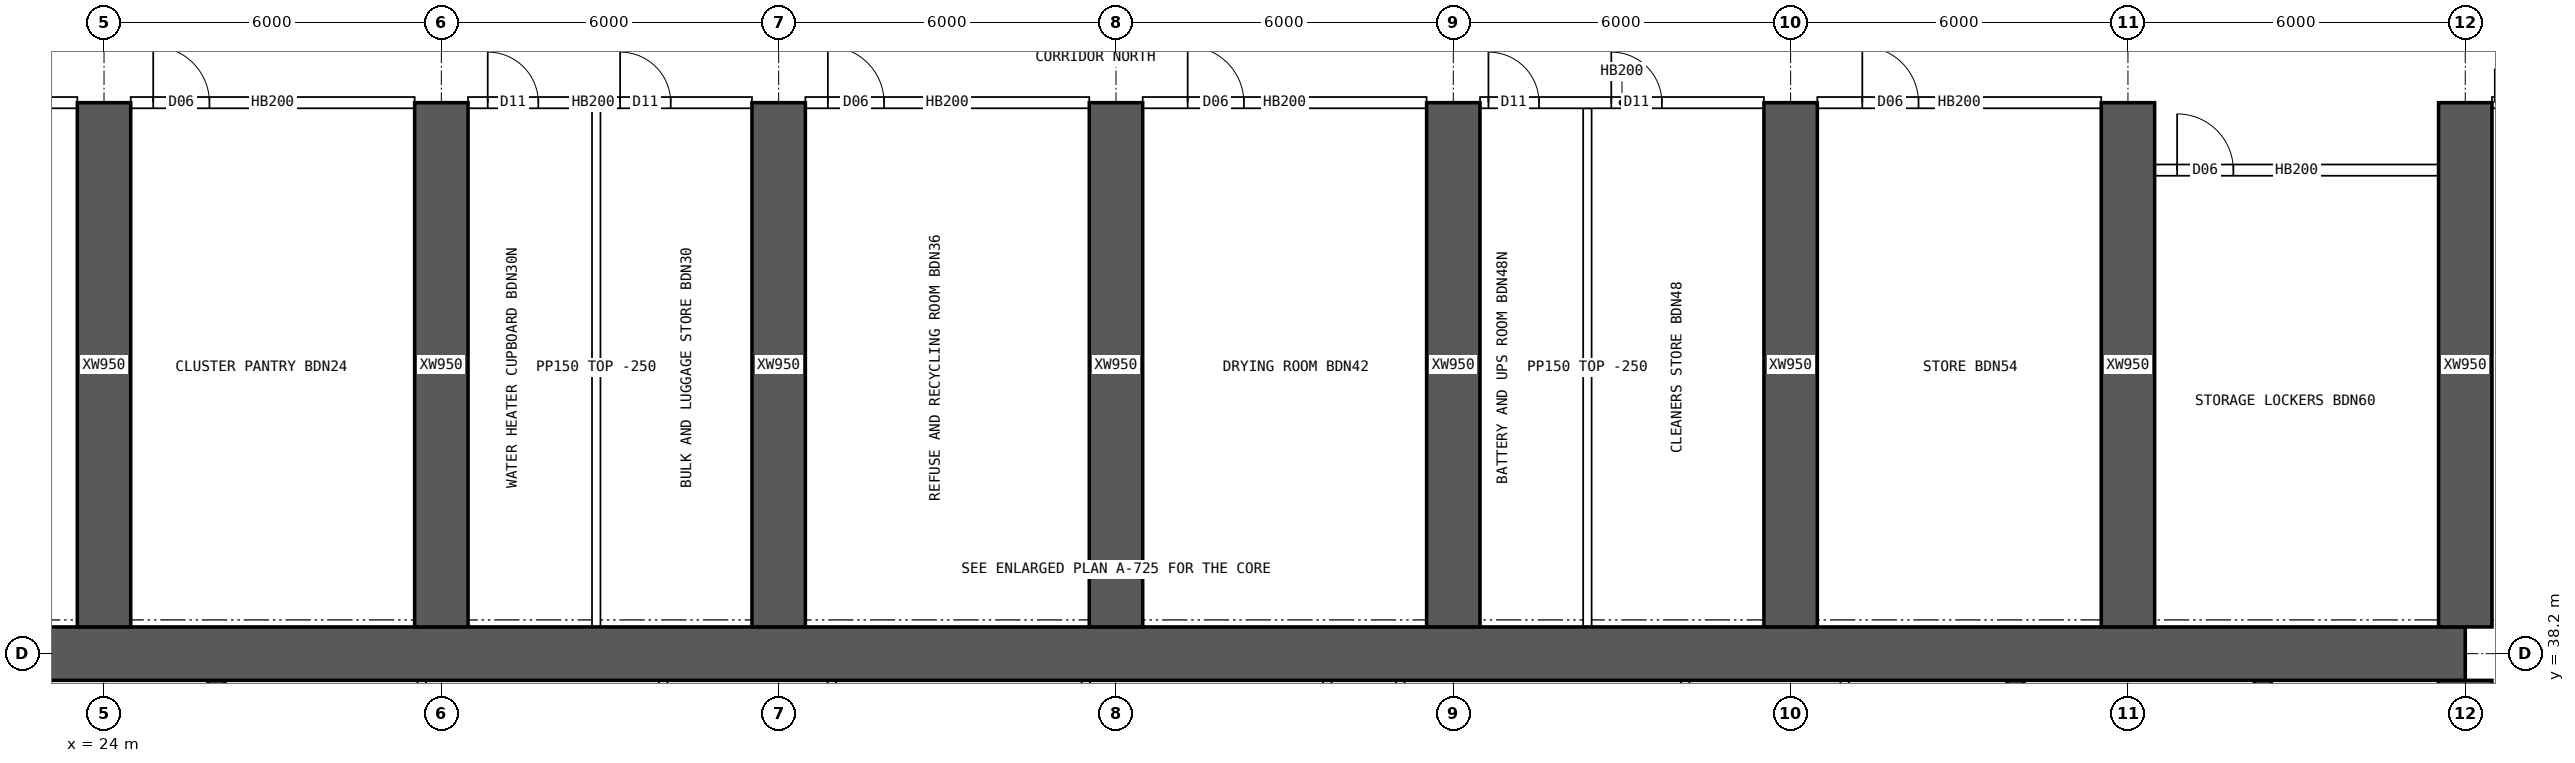
"""IFC4 building model, lengths in metres.
Left out: names, types, materials, properties, quantities, classifications, styles, units other than length and angle.
Written with IfcOpenShell. Run it as: python <this file> out.ifc"""

import sys

from ifc_helpers import new_model, si_unit, direction, frame, frame_2d, origin, place, context, subcontext, project, spatial, rectangle, extrude, element, fill, save


model = new_model("IFC4")
c1 = context("Model", 3, precision=1e-05, world=origin(), true_north=direction((0.0, 1.0)))
c2 = subcontext(c1, "Body", "Model", "MODEL_VIEW")
j1 = project(units=[si_unit("LENGTHUNIT", "METRE"), si_unit("PLANEANGLEUNIT", "RADIAN")], contexts=[c1])
p1 = place(None, origin())
s1 = spatial("IfcSite", under=j1, at=p1, CompositionType="ELEMENT")
p2 = place(p1, origin())
s2 = spatial("IfcBuilding", under=s1, at=p2, CompositionType="ELEMENT")
p3 = place(p2, frame((0.0, 0.0, 91.9)))
s3 = spatial("IfcBuildingStorey", under=s2, at=p3, CompositionType="ELEMENT", Elevation=91.9)
p4 = place(p3, frame((18.0, 38.2, 0.0), z_axis=(0.0, 0.0, 1.0), x_axis=(1.0, 0.0, 0.0)))
e1 = element("IfcWall", 1, at=p4, inside=s3, PredefinedType="SHEAR", context=c2, shape_type="SweptSolid", body=[
    extrude(rectangle(XDim=48.0, YDim=0.95, at=frame_2d((24.0, 0.0))), origin(), (0.0, 0.0, 1.0), 3.75),
])
p5 = place(p3, frame((66.0, 26.275, 0.0), z_axis=(0.0, 0.0, 1.0), x_axis=(0.0, 1.0, 0.0)))
e2 = element("IfcWall", 2, at=p5, inside=s3, PredefinedType="SHEAR", context=c2, shape_type="SweptSolid", body=[
    extrude(rectangle(XDim=11.45, YDim=0.95, at=frame_2d((5.725, 0.0))), origin(), (0.0, 0.0, 1.0), 3.75),
])
p6 = place(p5, frame((5.025, 0.0, 0.0)))
e3 = element("IfcOpeningElement", 3, at=p6, cuts=e2, PredefinedType="OPENING", context=c2, shape_type="SweptSolid", body=[
    extrude(rectangle(XDim=1.2, YDim=2.1, at=frame_2d((0.6, 1.05))), frame((0.0, 0.485, 0.0), z_axis=(0.0, -1.0, 0.0), x_axis=(1.0, 0.0, 0.0)), (0.0, 0.0, 1.0), 0.97),
])
for number, where, z_axis, x_axis in (
    (4, (62.4, 34.75, 0.0), (0.0, 0.0, 1.0), (0.0, 1.0, 0.0)),
    (5, (26.0, 34.75, 0.0), (0.0, 0.0, 1.0), (0.0, 1.0, 0.0)),
    (6, (58.0, 34.75, 0.0), (0.0, 0.0, 1.0), (0.0, 1.0, 0.0)),
):
    element("IfcWall", number, at=place(p3, frame(where, z_axis=z_axis, x_axis=x_axis)), inside=s3, PredefinedType="SHEAR", context=c2, shape_type="SweptSolid", body=[
        extrude(rectangle(XDim=2.975, YDim=0.3, at=frame_2d((1.488, 0.0))), origin(), (0.0, 0.0, 1.0), 3.75),
    ])
for number, where, z_axis, x_axis in (
    (7, (24.0, 38.675, 0.0), (0.0, 0.0, 1.0), (0.0, 1.0, 0.0)),
    (8, (30.0, 38.675, 0.0), (0.0, 0.0, 1.0), (0.0, 1.0, 0.0)),
    (9, (36.0, 38.675, 0.0), (0.0, 0.0, 1.0), (0.0, 1.0, 0.0)),
    (10, (42.0, 38.675, 0.0), (0.0, 0.0, 1.0), (0.0, 1.0, 0.0)),
    (11, (48.0, 38.675, 0.0), (0.0, 0.0, 1.0), (0.0, 1.0, 0.0)),
    (12, (54.0, 38.675, 0.0), (0.0, 0.0, 1.0), (0.0, 1.0, 0.0)),
    (13, (60.0, 38.675, 0.0), (0.0, 0.0, 1.0), (0.0, 1.0, 0.0)),
    (14, (66.0, 38.675, 0.0), (0.0, 0.0, 1.0), (0.0, 1.0, 0.0)),
):
    element("IfcWall", number, at=place(p3, frame(where, z_axis=z_axis, x_axis=x_axis)), inside=s3, PredefinedType="SHEAR", context=c2, shape_type="SweptSolid", body=[
        extrude(rectangle(XDim=9.325, YDim=0.95, at=frame_2d((4.663, 0.0))), origin(), (0.0, 0.0, 1.0), 3.75),
    ])
for number, where, z_axis, x_axis in (
    (15, (29.651, 34.75, 0.0), (0.0, 0.0, 1.0), (0.0, 1.0, 0.0)),
    (16, (33.946, 34.75, 0.0), (0.0, 0.0, 1.0), (0.0, 1.0, 0.0)),
    (17, (36.946, 34.75, 0.0), (0.0, 0.0, 1.0), (0.0, 1.0, 0.0)),
    (18, (41.463, 34.75, 0.0), (0.0, 0.0, 1.0), (0.0, 1.0, 0.0)),
    (19, (45.758, 34.75, 0.0), (0.0, 0.0, 1.0), (0.0, 1.0, 0.0)),
    (20, (47.058, 34.75, 0.0), (0.0, 0.0, 1.0), (0.0, 1.0, 0.0)),
    (21, (52.124, 34.75, 0.0), (0.0, 0.0, 1.0), (0.0, 1.0, 0.0)),
    (22, (54.961, 34.75, 0.0), (0.0, 0.0, 1.0), (0.0, 1.0, 0.0)),
):
    element("IfcWall", number, at=place(p3, frame(where, z_axis=z_axis, x_axis=x_axis)), inside=s3, PredefinedType="SOLIDWALL", context=c2, shape_type="SweptSolid", body=[
        extrude(rectangle(XDim=2.975, YDim=0.15, at=frame_2d((1.488, 0.0))), origin(), (0.0, 0.0, 1.0), 3.5),
    ])
p7 = place(p3, frame((18.475, 48.0, 0.0), z_axis=(0.0, 0.0, 1.0), x_axis=(1.0, 0.0, 0.0)))
e23 = element("IfcWall", 23, at=p7, inside=s3, PredefinedType="SOLIDWALL", context=c2, shape_type="SweptSolid", body=[
    extrude(rectangle(XDim=5.05, YDim=0.2, at=frame_2d((2.525, 0.0))), origin(), (0.0, 0.0, 1.0), 3.5),
])
p8 = place(p7, frame((0.35, 0.0, 0.0)))
e24 = element("IfcOpeningElement", 24, at=p8, cuts=e23, PredefinedType="OPENING", context=c2, shape_type="SweptSolid", body=[
    extrude(rectangle(XDim=0.9, YDim=2.1, at=frame_2d((0.45, 1.05))), frame((0.0, 0.11, 0.0), z_axis=(0.0, -1.0, 0.0), x_axis=(1.0, 0.0, 0.0)), (0.0, 0.0, 1.0), 0.22),
])
p9 = place(p7, frame((2.665, 0.0, 0.0)))
e25 = element("IfcOpeningElement", 25, at=p9, cuts=e23, PredefinedType="OPENING", context=c2, shape_type="SweptSolid", body=[
    extrude(rectangle(XDim=0.9, YDim=2.1, at=frame_2d((0.45, 1.05))), frame((0.0, 0.11, 0.0), z_axis=(0.0, -1.0, 0.0), x_axis=(1.0, 0.0, 0.0)), (0.0, 0.0, 1.0), 0.22),
])
p10 = place(p3, frame((24.475, 48.0, 0.0), z_axis=(0.0, 0.0, 1.0), x_axis=(1.0, 0.0, 0.0)))
e26 = element("IfcWall", 26, at=p10, inside=s3, PredefinedType="SOLIDWALL", context=c2, shape_type="SweptSolid", body=[
    extrude(rectangle(XDim=5.05, YDim=0.2, at=frame_2d((2.525, 0.0))), origin(), (0.0, 0.0, 1.0), 3.5),
])
p11 = place(p10, frame((0.4, 0.0, 0.0)))
e27 = element("IfcOpeningElement", 27, at=p11, cuts=e26, PredefinedType="OPENING", context=c2, shape_type="SweptSolid", body=[
    extrude(rectangle(XDim=1.0, YDim=2.1, at=frame_2d((0.5, 1.05))), frame((0.0, 0.11, 0.0), z_axis=(0.0, -1.0, 0.0), x_axis=(1.0, 0.0, 0.0)), (0.0, 0.0, 1.0), 0.22),
])
p12 = place(p3, frame((30.475, 48.0, 0.0), z_axis=(0.0, 0.0, 1.0), x_axis=(1.0, 0.0, 0.0)))
e28 = element("IfcWall", 28, at=p12, inside=s3, PredefinedType="SOLIDWALL", context=c2, shape_type="SweptSolid", body=[
    extrude(rectangle(XDim=5.05, YDim=0.2, at=frame_2d((2.525, 0.0))), origin(), (0.0, 0.0, 1.0), 3.5),
])
p13 = place(p12, frame((0.35, 0.0, 0.0)))
e29 = element("IfcOpeningElement", 29, at=p13, cuts=e28, PredefinedType="OPENING", context=c2, shape_type="SweptSolid", body=[
    extrude(rectangle(XDim=0.9, YDim=2.1, at=frame_2d((0.45, 1.05))), frame((0.0, 0.11, 0.0), z_axis=(0.0, -1.0, 0.0), x_axis=(1.0, 0.0, 0.0)), (0.0, 0.0, 1.0), 0.22),
])
p14 = place(p12, frame((2.705, 0.0, 0.0)))
e30 = element("IfcOpeningElement", 30, at=p14, cuts=e28, PredefinedType="OPENING", context=c2, shape_type="SweptSolid", body=[
    extrude(rectangle(XDim=0.9, YDim=2.1, at=frame_2d((0.45, 1.05))), frame((0.0, 0.11, 0.0), z_axis=(0.0, -1.0, 0.0), x_axis=(1.0, 0.0, 0.0)), (0.0, 0.0, 1.0), 0.22),
])
p15 = place(p3, frame((36.475, 48.0, 0.0), z_axis=(0.0, 0.0, 1.0), x_axis=(1.0, 0.0, 0.0)))
e31 = element("IfcWall", 31, at=p15, inside=s3, PredefinedType="SOLIDWALL", context=c2, shape_type="SweptSolid", body=[
    extrude(rectangle(XDim=5.05, YDim=0.2, at=frame_2d((2.525, 0.0))), origin(), (0.0, 0.0, 1.0), 3.5),
])
p16 = place(p15, frame((0.4, 0.0, 0.0)))
e32 = element("IfcOpeningElement", 32, at=p16, cuts=e31, PredefinedType="OPENING", context=c2, shape_type="SweptSolid", body=[
    extrude(rectangle(XDim=1.0, YDim=2.1, at=frame_2d((0.5, 1.05))), frame((0.0, 0.11, 0.0), z_axis=(0.0, -1.0, 0.0), x_axis=(1.0, 0.0, 0.0)), (0.0, 0.0, 1.0), 0.22),
])
p17 = place(p3, frame((42.475, 48.0, 0.0), z_axis=(0.0, 0.0, 1.0), x_axis=(1.0, 0.0, 0.0)))
e33 = element("IfcWall", 33, at=p17, inside=s3, PredefinedType="SOLIDWALL", context=c2, shape_type="SweptSolid", body=[
    extrude(rectangle(XDim=5.05, YDim=0.2, at=frame_2d((2.525, 0.0))), origin(), (0.0, 0.0, 1.0), 3.5),
])
p18 = place(p17, frame((0.8, 0.0, 0.0)))
e34 = element("IfcOpeningElement", 34, at=p18, cuts=e33, PredefinedType="OPENING", context=c2, shape_type="SweptSolid", body=[
    extrude(rectangle(XDim=1.0, YDim=2.1, at=frame_2d((0.5, 1.05))), frame((0.0, 0.11, 0.0), z_axis=(0.0, -1.0, 0.0), x_axis=(1.0, 0.0, 0.0)), (0.0, 0.0, 1.0), 0.22),
])
p19 = place(p3, frame((48.475, 48.0, 0.0), z_axis=(0.0, 0.0, 1.0), x_axis=(1.0, 0.0, 0.0)))
e35 = element("IfcWall", 35, at=p19, inside=s3, PredefinedType="SOLIDWALL", context=c2, shape_type="SweptSolid", body=[
    extrude(rectangle(XDim=5.05, YDim=0.2, at=frame_2d((2.525, 0.0))), origin(), (0.0, 0.0, 1.0), 3.5),
])
p20 = place(p19, frame((0.15, 0.0, 0.0)))
e36 = element("IfcOpeningElement", 36, at=p20, cuts=e35, PredefinedType="OPENING", context=c2, shape_type="SweptSolid", body=[
    extrude(rectangle(XDim=0.9, YDim=2.1, at=frame_2d((0.45, 1.05))), frame((0.0, 0.11, 0.0), z_axis=(0.0, -1.0, 0.0), x_axis=(1.0, 0.0, 0.0)), (0.0, 0.0, 1.0), 0.22),
])
p21 = place(p19, frame((2.335, 0.0, 0.0)))
e37 = element("IfcOpeningElement", 37, at=p21, cuts=e35, PredefinedType="OPENING", context=c2, shape_type="SweptSolid", body=[
    extrude(rectangle(XDim=0.9, YDim=2.1, at=frame_2d((0.45, 1.05))), frame((0.0, 0.11, 0.0), z_axis=(0.0, -1.0, 0.0), x_axis=(1.0, 0.0, 0.0)), (0.0, 0.0, 1.0), 0.22),
])
p22 = place(p3, frame((54.475, 48.0, 0.0), z_axis=(0.0, 0.0, 1.0), x_axis=(1.0, 0.0, 0.0)))
e38 = element("IfcWall", 38, at=p22, inside=s3, PredefinedType="SOLIDWALL", context=c2, shape_type="SweptSolid", body=[
    extrude(rectangle(XDim=5.05, YDim=0.2, at=frame_2d((2.525, 0.0))), origin(), (0.0, 0.0, 1.0), 3.5),
])
p23 = place(p22, frame((0.8, 0.0, 0.0)))
e39 = element("IfcOpeningElement", 39, at=p23, cuts=e38, PredefinedType="OPENING", context=c2, shape_type="SweptSolid", body=[
    extrude(rectangle(XDim=1.0, YDim=2.1, at=frame_2d((0.5, 1.05))), frame((0.0, 0.11, 0.0), z_axis=(0.0, -1.0, 0.0), x_axis=(1.0, 0.0, 0.0)), (0.0, 0.0, 1.0), 0.22),
])
p24 = place(p3, frame((66.475, 48.0, 0.0), z_axis=(0.0, 0.0, 1.0), x_axis=(1.0, 0.0, 0.0)))
e40 = element("IfcWall", 40, at=p24, inside=s3, PredefinedType="SOLIDWALL", context=c2, shape_type="SweptSolid", body=[
    extrude(rectangle(XDim=1.925, YDim=0.2, at=frame_2d((0.962, 0.0))), origin(), (0.0, 0.0, 1.0), 3.5),
])
p25 = place(p24, frame((0.05, 0.0, 0.0)))
e41 = element("IfcOpeningElement", 41, at=p25, cuts=e40, PredefinedType="OPENING", context=c2, shape_type="SweptSolid", body=[
    extrude(rectangle(XDim=1.2, YDim=2.1, at=frame_2d((0.6, 1.05))), frame((0.0, 0.11, 0.0), z_axis=(0.0, -1.0, 0.0), x_axis=(1.0, 0.0, 0.0)), (0.0, 0.0, 1.0), 0.22),
])
for number, where, z_axis, x_axis in (
    (42, (32.755, 38.675, 0.0), (0.0, 0.0, 1.0), (0.0, 1.0, 0.0)),
    (43, (50.385, 38.675, 0.0), (0.0, 0.0, 1.0), (0.0, 1.0, 0.0)),
):
    element("IfcWall", number, at=place(p3, frame(where, z_axis=z_axis, x_axis=x_axis)), inside=s3, PredefinedType="PARTITIONING", context=c2, shape_type="SweptSolid", body=[
        extrude(rectangle(XDim=9.225, YDim=0.15, at=frame_2d((4.612, 0.0))), origin(), (0.0, 0.0, 1.0), 3.5),
    ])
p26 = place(p3, frame((60.475, 46.8, 0.0), z_axis=(0.0, 0.0, 1.0), x_axis=(1.0, 0.0, 0.0)))
e44 = element("IfcWall", 44, at=p26, inside=s3, PredefinedType="SOLIDWALL", context=c2, shape_type="SweptSolid", body=[
    extrude(rectangle(XDim=5.05, YDim=0.2, at=frame_2d((2.525, 0.0))), origin(), (0.0, 0.0, 1.0), 3.5),
])
p27 = place(p26, frame((0.4, 0.0, 0.0)))
e45 = element("IfcOpeningElement", 45, at=p27, cuts=e44, PredefinedType="OPENING", context=c2, shape_type="SweptSolid", body=[
    extrude(rectangle(XDim=1.0, YDim=2.1, at=frame_2d((0.5, 1.05))), frame((0.0, 0.11, 0.0), z_axis=(0.0, -1.0, 0.0), x_axis=(1.0, 0.0, 0.0)), (0.0, 0.0, 1.0), 0.22),
])
p28 = place(p11, origin())
e46 = element("IfcDoor", 46, at=p28, inside=s3, OperationType="SINGLE_SWING_LEFT", PredefinedType="DOOR", context=c2, shape_type="SweptSolid", body=[
    extrude(rectangle(XDim=1.0, YDim=2.1, at=frame_2d((0.5, 1.05))), frame((0.0, 0.025, 0.0), z_axis=(0.0, -1.0, 0.0), x_axis=(1.0, 0.0, 0.0)), (0.0, 0.0, 1.0), 0.05),
])
fill(e27, e46)
p29 = place(p13, origin())
e47 = element("IfcDoor", 47, at=p29, inside=s3, OperationType="SINGLE_SWING_LEFT", PredefinedType="DOOR", context=c2, shape_type="SweptSolid", body=[
    extrude(rectangle(XDim=0.9, YDim=2.1, at=frame_2d((0.45, 1.05))), frame((0.0, 0.025, 0.0), z_axis=(0.0, -1.0, 0.0), x_axis=(1.0, 0.0, 0.0)), (0.0, 0.0, 1.0), 0.05),
])
fill(e29, e47)
p30 = place(p14, origin())
e48 = element("IfcDoor", 48, at=p30, inside=s3, OperationType="SINGLE_SWING_LEFT", PredefinedType="DOOR", context=c2, shape_type="SweptSolid", body=[
    extrude(rectangle(XDim=0.9, YDim=2.1, at=frame_2d((0.45, 1.05))), frame((0.0, 0.025, 0.0), z_axis=(0.0, -1.0, 0.0), x_axis=(1.0, 0.0, 0.0)), (0.0, 0.0, 1.0), 0.05),
])
fill(e30, e48)
p31 = place(p16, origin())
e49 = element("IfcDoor", 49, at=p31, inside=s3, OperationType="SINGLE_SWING_LEFT", PredefinedType="DOOR", context=c2, shape_type="SweptSolid", body=[
    extrude(rectangle(XDim=1.0, YDim=2.1, at=frame_2d((0.5, 1.05))), frame((0.0, 0.025, 0.0), z_axis=(0.0, -1.0, 0.0), x_axis=(1.0, 0.0, 0.0)), (0.0, 0.0, 1.0), 0.05),
])
fill(e32, e49)
p32 = place(p18, origin())
e50 = element("IfcDoor", 50, at=p32, inside=s3, OperationType="SINGLE_SWING_LEFT", PredefinedType="DOOR", context=c2, shape_type="SweptSolid", body=[
    extrude(rectangle(XDim=1.0, YDim=2.1, at=frame_2d((0.5, 1.05))), frame((0.0, 0.025, 0.0), z_axis=(0.0, -1.0, 0.0), x_axis=(1.0, 0.0, 0.0)), (0.0, 0.0, 1.0), 0.05),
])
fill(e34, e50)
p33 = place(p20, origin())
e51 = element("IfcDoor", 51, at=p33, inside=s3, OperationType="SINGLE_SWING_LEFT", PredefinedType="DOOR", context=c2, shape_type="SweptSolid", body=[
    extrude(rectangle(XDim=0.9, YDim=2.1, at=frame_2d((0.45, 1.05))), frame((0.0, 0.025, 0.0), z_axis=(0.0, -1.0, 0.0), x_axis=(1.0, 0.0, 0.0)), (0.0, 0.0, 1.0), 0.05),
])
fill(e36, e51)
p34 = place(p21, origin())
e52 = element("IfcDoor", 52, at=p34, inside=s3, OperationType="SINGLE_SWING_LEFT", PredefinedType="DOOR", context=c2, shape_type="SweptSolid", body=[
    extrude(rectangle(XDim=0.9, YDim=2.1, at=frame_2d((0.45, 1.05))), frame((0.0, 0.025, 0.0), z_axis=(0.0, -1.0, 0.0), x_axis=(1.0, 0.0, 0.0)), (0.0, 0.0, 1.0), 0.05),
])
fill(e37, e52)
p35 = place(p23, origin())
e53 = element("IfcDoor", 53, at=p35, inside=s3, OperationType="SINGLE_SWING_LEFT", PredefinedType="DOOR", context=c2, shape_type="SweptSolid", body=[
    extrude(rectangle(XDim=1.0, YDim=2.1, at=frame_2d((0.5, 1.05))), frame((0.0, 0.025, 0.0), z_axis=(0.0, -1.0, 0.0), x_axis=(1.0, 0.0, 0.0)), (0.0, 0.0, 1.0), 0.05),
])
fill(e39, e53)
p36 = place(p27, origin())
e54 = element("IfcDoor", 54, at=p36, inside=s3, OperationType="SINGLE_SWING_LEFT", PredefinedType="DOOR", context=c2, shape_type="SweptSolid", body=[
    extrude(rectangle(XDim=1.0, YDim=2.1, at=frame_2d((0.5, 1.05))), frame((0.0, 0.025, 0.0), z_axis=(0.0, -1.0, 0.0), x_axis=(1.0, 0.0, 0.0)), (0.0, 0.0, 1.0), 0.05),
])
fill(e45, e54)
save(model, sys.argv[1])
